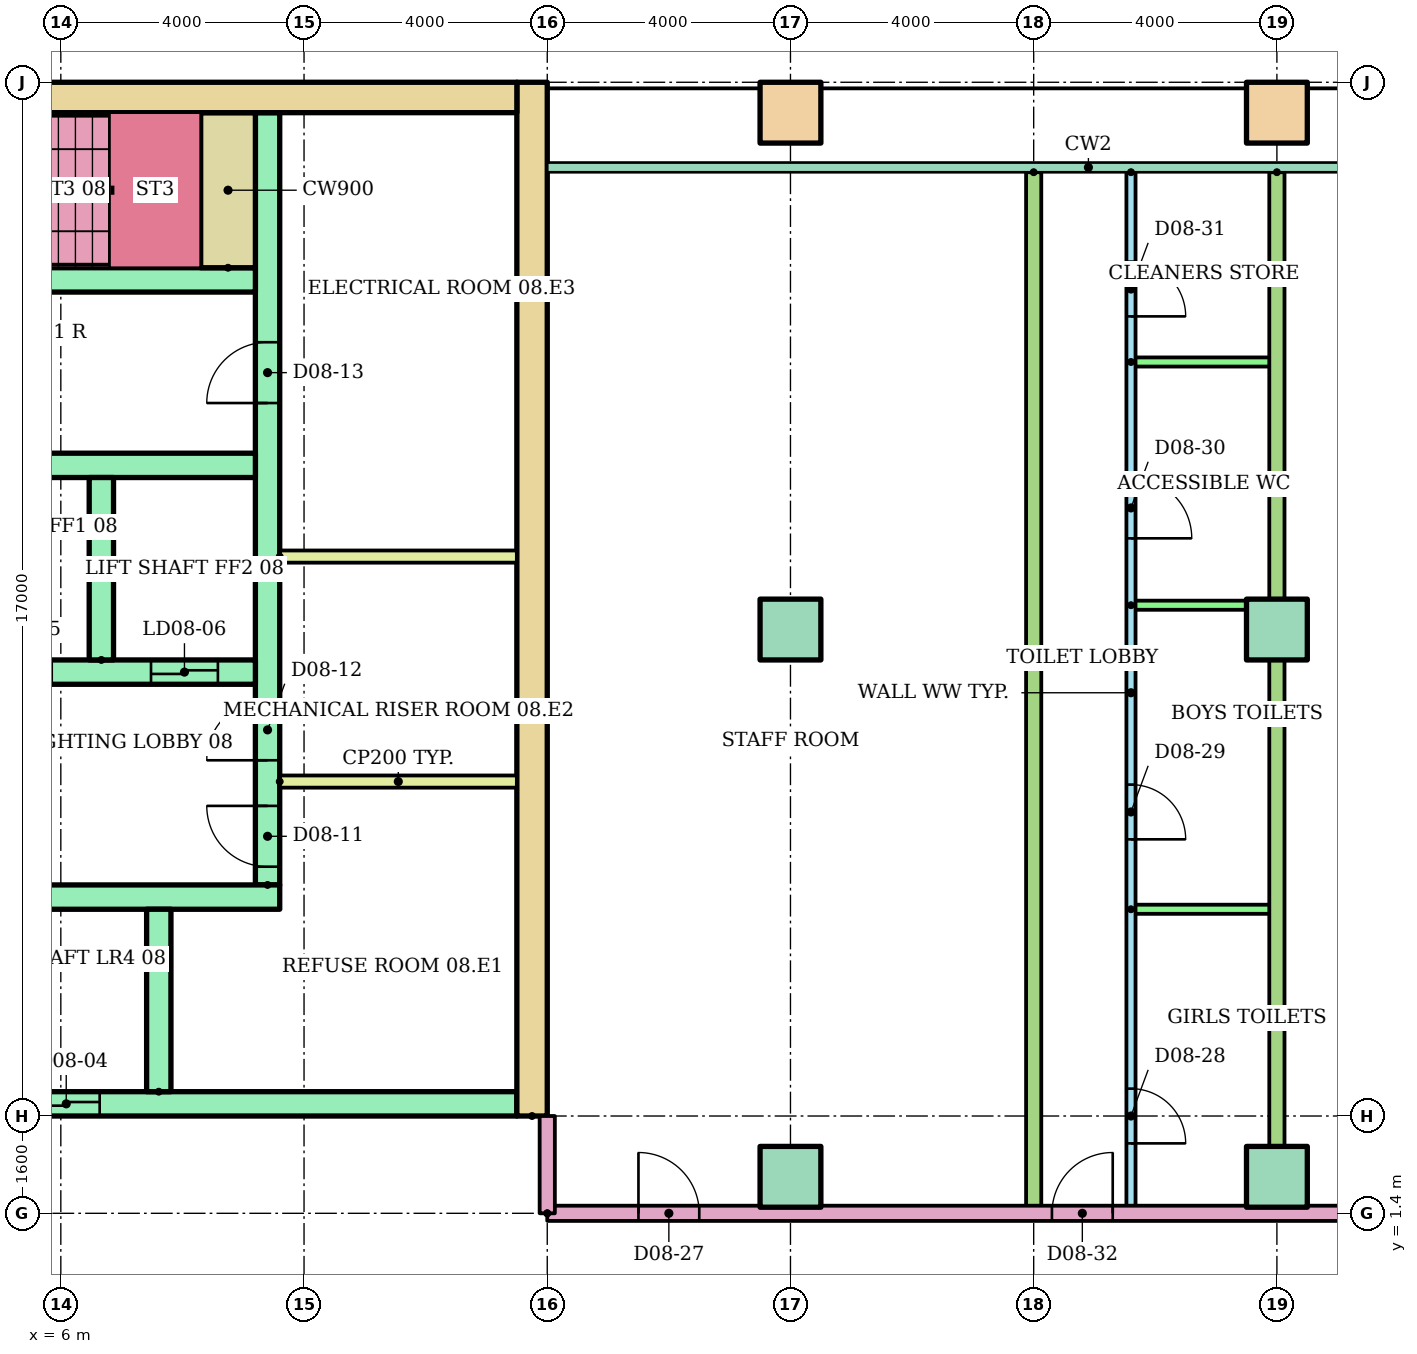
"""IFC4 building model, lengths in metres.
Left out: names, types, materials, properties, quantities, classifications, styles, units other than length and angle.
Written with IfcOpenShell. Run it as: python <this file> out.ifc"""

import sys

from ifc_helpers import new_model, si_unit, direction, frame, frame_2d, origin, origin_2d, place, context, subcontext, project, spatial, rectangle, hollow_rectangle, extrude, element, fill, save


model = new_model("IFC4")
c1 = context("Model", 3, precision=1e-05, world=origin(), true_north=direction((0.0, 1.0)))
c2 = subcontext(c1, "Body", "Model", "MODEL_VIEW")
j1 = project(units=[si_unit("LENGTHUNIT", "METRE"), si_unit("PLANEANGLEUNIT", "RADIAN")], contexts=[c1])
p1 = place(None, origin())
s1 = spatial("IfcSite", under=j1, at=p1, CompositionType="ELEMENT")
p2 = place(p1, origin())
s2 = spatial("IfcBuilding", under=s1, at=p2, CompositionType="ELEMENT")
p3 = place(p2, frame((0.0, 0.0, 33.8)))
s3 = spatial("IfcBuildingStorey", under=s2, at=p3, CompositionType="ELEMENT", Elevation=33.8)
for number, where in (
    (1, (18.0, 2.0, 0.0)),
    (2, (26.0, 2.0, 0.0)),
    (3, (18.0, 11.0, 0.0)),
    (4, (26.0, 11.0, 0.0)),
):
    element("IfcColumn", number, at=place(p3, frame(where)), inside=s3, PredefinedType="COLUMN", context=c2, shape_type="SweptSolid", body=[
        extrude(rectangle(XDim=1.0, YDim=1.0, at=origin_2d()), origin(), (0.0, 0.0, 1.0), 3.9),
    ])
for number, where in (
    (5, (18.0, 19.5, 0.0)),
    (6, (26.0, 19.5, 0.0)),
):
    element("IfcColumn", number, at=place(p3, frame(where)), inside=s3, PredefinedType="COLUMN", context=c2, shape_type="SweptSolid", body=[
        extrude(hollow_rectangle(XDim=1.0, YDim=1.0, WallThickness=0.05, at=origin_2d()), origin(), (0.0, 0.0, 1.0), 3.9),
    ])
p4 = place(p3, frame((13.75, 3.0, 0.0), z_axis=(0.0, 0.0, 1.0), x_axis=(0.0, 1.0, 0.0)))
e7 = element("IfcWall", 7, at=p4, inside=s3, PredefinedType="SHEAR", context=c2, shape_type="SweptSolid", body=[
    extrude(rectangle(XDim=17.0, YDim=0.5, at=frame_2d((8.5, 0.0))), origin(), (0.0, 0.0, 1.0), 3.6),
])
p5 = place(p3, frame((-13.5, 19.75, 0.0)))
e8 = element("IfcWall", 8, at=p5, inside=s3, PredefinedType="SHEAR", context=c2, shape_type="SweptSolid", body=[
    extrude(rectangle(XDim=27.0, YDim=0.5, at=frame_2d((13.5, 0.0))), origin(), (0.0, 0.0, 1.0), 3.6),
])
p6 = place(p3, frame((9.4, 6.8, 0.0), z_axis=(0.0, 0.0, 1.0), x_axis=(0.0, 1.0, 0.0)))
e9 = element("IfcWall", 9, at=p6, inside=s3, PredefinedType="SHEAR", context=c2, shape_type="SweptSolid", body=[
    extrude(rectangle(XDim=12.7, YDim=0.4, at=frame_2d((6.35, 0.0))), origin(), (0.0, 0.0, 1.0), 3.6),
])
p7 = place(p6, frame((0.3, 0.0, 0.0)))
e10 = element("IfcOpeningElement", 10, at=p7, cuts=e9, PredefinedType="OPENING", context=c2, shape_type="SweptSolid", body=[
    extrude(rectangle(XDim=1.0, YDim=2.1, at=frame_2d((0.5, 1.05))), frame((0.0, 0.21, 0.0), z_axis=(0.0, -1.0, 0.0), x_axis=(1.0, 0.0, 0.0)), (0.0, 0.0, 1.0), 0.42),
])
p8 = place(p6, frame((2.05, 0.0, 0.0)))
e11 = element("IfcOpeningElement", 11, at=p8, cuts=e9, PredefinedType="OPENING", context=c2, shape_type="SweptSolid", body=[
    extrude(rectangle(XDim=1.0, YDim=2.1, at=frame_2d((0.5, 1.05))), frame((0.0, 0.21, 0.0), z_axis=(0.0, -1.0, 0.0), x_axis=(1.0, 0.0, 0.0)), (0.0, 0.0, 1.0), 0.42),
])
p9 = place(p6, frame((7.925, 0.0, 0.0)))
e12 = element("IfcOpeningElement", 12, at=p9, cuts=e9, PredefinedType="OPENING", context=c2, shape_type="SweptSolid", body=[
    extrude(rectangle(XDim=1.0, YDim=2.1, at=frame_2d((0.5, 1.05))), frame((0.0, 0.21, 0.0), z_axis=(0.0, -1.0, 0.0), x_axis=(1.0, 0.0, 0.0)), (0.0, 0.0, 1.0), 0.42),
])
p10 = place(p3, frame((-13.5, 3.2, 0.0)))
e13 = element("IfcWall", 13, at=p10, inside=s3, PredefinedType="SHEAR", context=c2, shape_type="SweptSolid", body=[
    extrude(rectangle(XDim=27.0, YDim=0.4, at=frame_2d((13.5, 0.0))), origin(), (0.0, 0.0, 1.0), 3.6),
])
p11 = place(p10, frame((6.861, 0.0, 0.0)))
e14 = element("IfcOpeningElement", 14, at=p11, cuts=e13, PredefinedType="OPENING", context=c2, shape_type="SweptSolid", body=[
    extrude(rectangle(XDim=1.1, YDim=2.1, at=frame_2d((0.55, 1.05))), frame((0.0, 0.21, 0.0), z_axis=(0.0, -1.0, 0.0), x_axis=(1.0, 0.0, 0.0)), (0.0, 0.0, 1.0), 0.42),
])
p12 = place(p10, frame((9.906, 0.0, 0.0)))
e15 = element("IfcOpeningElement", 15, at=p12, cuts=e13, PredefinedType="OPENING", context=c2, shape_type="SweptSolid", body=[
    extrude(rectangle(XDim=1.1, YDim=2.1, at=frame_2d((0.55, 1.05))), frame((0.0, 0.21, 0.0), z_axis=(0.0, -1.0, 0.0), x_axis=(1.0, 0.0, 0.0)), (0.0, 0.0, 1.0), 0.42),
])
p13 = place(p10, frame((15.994, 0.0, 0.0)))
e16 = element("IfcOpeningElement", 16, at=p13, cuts=e13, PredefinedType="OPENING", context=c2, shape_type="SweptSolid", body=[
    extrude(rectangle(XDim=1.1, YDim=2.1, at=frame_2d((0.55, 1.05))), frame((0.0, 0.21, 0.0), z_axis=(0.0, -1.0, 0.0), x_axis=(1.0, 0.0, 0.0)), (0.0, 0.0, 1.0), 0.42),
])
p14 = place(p10, frame((19.039, 0.0, 0.0)))
e17 = element("IfcOpeningElement", 17, at=p14, cuts=e13, PredefinedType="OPENING", context=c2, shape_type="SweptSolid", body=[
    extrude(rectangle(XDim=1.1, YDim=2.1, at=frame_2d((0.55, 1.05))), frame((0.0, 0.21, 0.0), z_axis=(0.0, -1.0, 0.0), x_axis=(1.0, 0.0, 0.0)), (0.0, 0.0, 1.0), 0.42),
])
p15 = place(p10, frame((12.6, 0.0, 0.0)))
e18 = element("IfcOpeningElement", 18, at=p15, cuts=e13, PredefinedType="OPENING", context=c2, shape_type="SweptSolid", body=[
    extrude(rectangle(XDim=1.8, YDim=2.1, at=frame_2d((0.9, 1.05))), frame((0.0, 0.21, 0.0), z_axis=(0.0, -1.0, 0.0), x_axis=(1.0, 0.0, 0.0)), (0.0, 0.0, 1.0), 0.42),
])
p16 = place(p3, frame((1.522, 6.6, 0.0)))
e19 = element("IfcWall", 19, at=p16, inside=s3, PredefinedType="SHEAR", context=c2, shape_type="SweptSolid", body=[
    extrude(rectangle(XDim=8.078, YDim=0.4, at=frame_2d((4.039, 0.0))), origin(), (0.0, 0.0, 1.0), 3.6),
])
p17 = place(p3, frame((7.611, 3.4, 0.0), z_axis=(0.0, 0.0, 1.0), x_axis=(0.0, 1.0, 0.0)))
e20 = element("IfcWall", 20, at=p17, inside=s3, PredefinedType="SHEAR", context=c2, shape_type="SweptSolid", body=[
    extrude(rectangle(XDim=3.0, YDim=0.4, at=frame_2d((1.5, 0.0))), origin(), (0.0, 0.0, 1.0), 3.6),
])
p18 = place(p3, frame((1.2, 10.3, 0.0)))
e21 = element("IfcWall", 21, at=p18, inside=s3, PredefinedType="SHEAR", context=c2, shape_type="SweptSolid", body=[
    extrude(rectangle(XDim=8.0, YDim=0.4, at=frame_2d((4.0, 0.0))), origin(), (0.0, 0.0, 1.0), 3.6),
])
p19 = place(p18, frame((3.55, 0.0, 0.0)))
e22 = element("IfcOpeningElement", 22, at=p19, cuts=e21, PredefinedType="OPENING", context=c2, shape_type="SweptSolid", body=[
    extrude(rectangle(XDim=1.1, YDim=2.1, at=frame_2d((0.55, 1.05))), frame((0.0, 0.21, 0.0), z_axis=(0.0, -1.0, 0.0), x_axis=(1.0, 0.0, 0.0)), (0.0, 0.0, 1.0), 0.42),
])
p20 = place(p18, frame((6.283, 0.0, 0.0)))
e23 = element("IfcOpeningElement", 23, at=p20, cuts=e21, PredefinedType="OPENING", context=c2, shape_type="SweptSolid", body=[
    extrude(rectangle(XDim=1.1, YDim=2.1, at=frame_2d((0.55, 1.05))), frame((0.0, 0.21, 0.0), z_axis=(0.0, -1.0, 0.0), x_axis=(1.0, 0.0, 0.0)), (0.0, 0.0, 1.0), 0.42),
])
p21 = place(p18, frame((0.867, 0.0, 0.0)))
e24 = element("IfcOpeningElement", 24, at=p21, cuts=e21, PredefinedType="OPENING", context=c2, shape_type="SweptSolid", body=[
    extrude(rectangle(XDim=1.0, YDim=2.1, at=frame_2d((0.5, 1.05))), frame((0.0, 0.21, 0.0), z_axis=(0.0, -1.0, 0.0), x_axis=(1.0, 0.0, 0.0)), (0.0, 0.0, 1.0), 0.42),
])
p22 = place(p3, frame((1.2, 13.7, 0.0)))
e25 = element("IfcWall", 25, at=p22, inside=s3, PredefinedType="SHEAR", context=c2, shape_type="SweptSolid", body=[
    extrude(rectangle(XDim=8.0, YDim=0.4, at=frame_2d((4.0, 0.0))), origin(), (0.0, 0.0, 1.0), 3.6),
])
p23 = place(p3, frame((6.667, 10.5, 0.0), z_axis=(0.0, 0.0, 1.0), x_axis=(0.0, 1.0, 0.0)))
e26 = element("IfcWall", 26, at=p23, inside=s3, PredefinedType="SHEAR", context=c2, shape_type="SweptSolid", body=[
    extrude(rectangle(XDim=3.0, YDim=0.4, at=frame_2d((1.5, 0.0))), origin(), (0.0, 0.0, 1.0), 3.6),
])
p24 = place(p3, frame((-9.2, 16.75, 0.0)))
e27 = element("IfcWall", 27, at=p24, inside=s3, PredefinedType="SHEAR", context=c2, shape_type="SweptSolid", body=[
    extrude(rectangle(XDim=18.4, YDim=0.4, at=frame_2d((9.2, 0.0))), origin(), (0.0, 0.0, 1.0), 3.6),
])
p25 = place(p24, frame((0.1, 0.0, 0.0)))
e28 = element("IfcOpeningElement", 28, at=p25, cuts=e27, PredefinedType="OPENING", context=c2, shape_type="SweptSolid", body=[
    extrude(rectangle(XDim=0.95, YDim=2.1, at=frame_2d((0.475, 1.05))), frame((0.0, 0.21, 0.0), z_axis=(0.0, -1.0, 0.0), x_axis=(1.0, 0.0, 0.0)), (0.0, 0.0, 1.0), 0.42),
])
p26 = place(p24, frame((6.1, 0.0, 0.0)))
e29 = element("IfcOpeningElement", 29, at=p26, cuts=e27, PredefinedType="OPENING", context=c2, shape_type="SweptSolid", body=[
    extrude(rectangle(XDim=0.95, YDim=2.1, at=frame_2d((0.475, 1.05))), frame((0.0, 0.21, 0.0), z_axis=(0.0, -1.0, 0.0), x_axis=(1.0, 0.0, 0.0)), (0.0, 0.0, 1.0), 0.42),
])
p27 = place(p24, frame((12.1, 0.0, 0.0)))
e30 = element("IfcOpeningElement", 30, at=p27, cuts=e27, PredefinedType="OPENING", context=c2, shape_type="SweptSolid", body=[
    extrude(rectangle(XDim=0.95, YDim=2.1, at=frame_2d((0.475, 1.05))), frame((0.0, 0.21, 0.0), z_axis=(0.0, -1.0, 0.0), x_axis=(1.0, 0.0, 0.0)), (0.0, 0.0, 1.0), 0.42),
])
p28 = place(p3, frame((8.75, 16.95, 0.0), z_axis=(0.0, 0.0, 1.0), x_axis=(0.0, 1.0, 0.0)))
e31 = element("IfcWall", 31, at=p28, inside=s3, PredefinedType="SHEAR", context=c2, shape_type="SweptSolid", body=[
    extrude(rectangle(XDim=2.55, YDim=0.9, at=frame_2d((1.275, 0.0))), origin(), (0.0, 0.0, 1.0), 3.6),
])
for number, where in (
    (32, (9.6, 8.5, 0.0)),
    (33, (9.6, 12.2, 0.0)),
):
    element("IfcWall", number, at=place(p3, frame(where)), inside=s3, PredefinedType="PARTITIONING", context=c2, shape_type="SweptSolid", body=[
        extrude(rectangle(XDim=3.9, YDim=0.2, at=frame_2d((1.95, 0.0))), origin(), (0.0, 0.0, 1.0), 3.6),
    ])
p29 = place(p3, frame((14.0, 1.4, 0.0)))
e34 = element("IfcWall", 34, at=p29, inside=s3, PredefinedType="PARTITIONING", context=c2, shape_type="SweptSolid", body=[
    extrude(rectangle(XDim=15.0, YDim=0.25, at=frame_2d((7.5, 0.0))), origin(), (0.0, 0.0, 1.0), 3.1),
])
p30 = place(p29, frame((1.5, 0.0, 0.0)))
e35 = element("IfcOpeningElement", 35, at=p30, cuts=e34, PredefinedType="OPENING", context=c2, shape_type="SweptSolid", body=[
    extrude(rectangle(XDim=1.0, YDim=2.1, at=frame_2d((0.5, 1.05))), frame((0.0, 0.135, 0.0), z_axis=(0.0, -1.0, 0.0), x_axis=(1.0, 0.0, 0.0)), (0.0, 0.0, 1.0), 0.27),
])
p31 = place(p29, frame((8.3, 0.0, 0.0)))
e36 = element("IfcOpeningElement", 36, at=p31, cuts=e34, PredefinedType="OPENING", context=c2, shape_type="SweptSolid", body=[
    extrude(rectangle(XDim=1.0, YDim=2.1, at=frame_2d((0.5, 1.05))), frame((0.0, 0.135, 0.0), z_axis=(0.0, -1.0, 0.0), x_axis=(1.0, 0.0, 0.0)), (0.0, 0.0, 1.0), 0.27),
])
p32 = place(p29, frame((13.5, 0.0, 0.0)))
e37 = element("IfcOpeningElement", 37, at=p32, cuts=e34, PredefinedType="OPENING", context=c2, shape_type="SweptSolid", body=[
    extrude(rectangle(XDim=1.0, YDim=2.1, at=frame_2d((0.5, 1.05))), frame((0.0, 0.135, 0.0), z_axis=(0.0, -1.0, 0.0), x_axis=(1.0, 0.0, 0.0)), (0.0, 0.0, 1.0), 0.27),
])
p33 = place(p3, frame((23.6, 18.521, 0.0), z_axis=(0.0, 0.0, 1.0), x_axis=(0.0, -1.0, 0.0)))
e38 = element("IfcWall", 38, at=p33, inside=s3, PredefinedType="PARTITIONING", context=c2, shape_type="SweptSolid", body=[
    extrude(rectangle(XDim=17.121, YDim=0.15, at=frame_2d((8.561, 0.0))), origin(), (0.0, 0.0, 1.0), 3.1),
])
p34 = place(p33, frame((15.071, 0.0, 0.0)))
e39 = element("IfcOpeningElement", 39, at=p34, cuts=e38, PredefinedType="OPENING", context=c2, shape_type="SweptSolid", body=[
    extrude(rectangle(XDim=0.9, YDim=2.1, at=frame_2d((0.45, 1.05))), frame((0.0, 0.085, 0.0), z_axis=(0.0, -1.0, 0.0), x_axis=(1.0, 0.0, 0.0)), (0.0, 0.0, 1.0), 0.17),
])
p35 = place(p33, frame((10.071, 0.0, 0.0)))
e40 = element("IfcOpeningElement", 40, at=p35, cuts=e38, PredefinedType="OPENING", context=c2, shape_type="SweptSolid", body=[
    extrude(rectangle(XDim=0.9, YDim=2.1, at=frame_2d((0.45, 1.05))), frame((0.0, 0.085, 0.0), z_axis=(0.0, -1.0, 0.0), x_axis=(1.0, 0.0, 0.0)), (0.0, 0.0, 1.0), 0.17),
])
p36 = place(p33, frame((5.021, 0.0, 0.0)))
e41 = element("IfcOpeningElement", 41, at=p36, cuts=e38, PredefinedType="OPENING", context=c2, shape_type="SweptSolid", body=[
    extrude(rectangle(XDim=1.0, YDim=2.1, at=frame_2d((0.5, 1.05))), frame((0.0, 0.085, 0.0), z_axis=(0.0, -1.0, 0.0), x_axis=(1.0, 0.0, 0.0)), (0.0, 0.0, 1.0), 0.17),
])
p37 = place(p33, frame((1.471, 0.0, 0.0)))
e42 = element("IfcOpeningElement", 42, at=p37, cuts=e38, PredefinedType="OPENING", context=c2, shape_type="SweptSolid", body=[
    extrude(rectangle(XDim=0.9, YDim=2.1, at=frame_2d((0.45, 1.05))), frame((0.0, 0.085, 0.0), z_axis=(0.0, -1.0, 0.0), x_axis=(1.0, 0.0, 0.0)), (0.0, 0.0, 1.0), 0.17),
])
for number, where in (
    (43, (23.6, 6.4, 0.0)),
    (44, (23.6, 11.4, 0.0)),
    (45, (23.6, 15.4, 0.0)),
):
    element("IfcWall", number, at=place(p3, frame(where)), inside=s3, PredefinedType="PARTITIONING", context=c2, shape_type="SweptSolid", body=[
        extrude(rectangle(XDim=2.4, YDim=0.15, at=frame_2d((1.2, 0.0))), origin(), (0.0, 0.0, 1.0), 3.1),
    ])
for number, where, z_axis, x_axis in (
    (46, (22.0, 18.521, 0.0), (0.0, 0.0, 1.0), (0.0, -1.0, 0.0)),
    (47, (26.0, 18.521, 0.0), (0.0, 0.0, 1.0), (0.0, -1.0, 0.0)),
):
    element("IfcWall", number, at=place(p3, frame(where, z_axis=z_axis, x_axis=x_axis)), inside=s3, PredefinedType="PARTITIONING", context=c2, shape_type="SweptSolid", body=[
        extrude(rectangle(XDim=17.121, YDim=0.25, at=frame_2d((8.561, 0.0))), origin(), (0.0, 0.0, 1.0), 3.1),
    ])
p38 = place(p3, frame((14.0, 1.4, 0.0), z_axis=(0.0, 0.0, 1.0), x_axis=(0.0, 1.0, 0.0)))
e48 = element("IfcWall", 48, at=p38, inside=s3, PredefinedType="PARTITIONING", context=c2, shape_type="SweptSolid", body=[
    extrude(rectangle(XDim=1.6, YDim=0.25, at=frame_2d((0.8, 0.0))), origin(), (0.0, 0.0, 1.0), 3.1),
])
p39 = place(p14, origin())
e49 = element("IfcDoor", 49, at=p39, inside=s3, OperationType="SLIDING_TO_LEFT", PredefinedType="DOOR", context=c2, shape_type="SweptSolid", body=[
    extrude(rectangle(XDim=1.1, YDim=2.1, at=frame_2d((0.55, 1.05))), frame((0.0, 0.025, 0.0), z_axis=(0.0, -1.0, 0.0), x_axis=(1.0, 0.0, 0.0)), (0.0, 0.0, 1.0), 0.05),
])
fill(e17, e49)
p40 = place(p20, origin())
e50 = element("IfcDoor", 50, at=p40, inside=s3, OperationType="SLIDING_TO_LEFT", PredefinedType="DOOR", context=c2, shape_type="SweptSolid", body=[
    extrude(rectangle(XDim=1.1, YDim=2.1, at=frame_2d((0.55, 1.05))), frame((0.0, 0.025, 0.0), z_axis=(0.0, -1.0, 0.0), x_axis=(1.0, 0.0, 0.0)), (0.0, 0.0, 1.0), 0.05),
])
fill(e23, e50)
p41 = place(p7, origin())
e51 = element("IfcDoor", 51, at=p41, inside=s3, OperationType="SINGLE_SWING_RIGHT", PredefinedType="DOOR", context=c2, shape_type="SweptSolid", body=[
    extrude(rectangle(XDim=1.0, YDim=2.1, at=frame_2d((0.5, 1.05))), frame((0.0, 0.025, 0.0), z_axis=(0.0, -1.0, 0.0), x_axis=(1.0, 0.0, 0.0)), (0.0, 0.0, 1.0), 0.05),
])
fill(e10, e51)
p42 = place(p8, origin())
e52 = element("IfcDoor", 52, at=p42, inside=s3, OperationType="SINGLE_SWING_LEFT", PredefinedType="DOOR", context=c2, shape_type="SweptSolid", body=[
    extrude(rectangle(XDim=1.0, YDim=2.1, at=frame_2d((0.5, 1.05))), frame((0.0, 0.025, 0.0), z_axis=(0.0, -1.0, 0.0), x_axis=(1.0, 0.0, 0.0)), (0.0, 0.0, 1.0), 0.05),
])
fill(e11, e52)
p43 = place(p9, origin())
e53 = element("IfcDoor", 53, at=p43, inside=s3, OperationType="SINGLE_SWING_LEFT", PredefinedType="DOOR", context=c2, shape_type="SweptSolid", body=[
    extrude(rectangle(XDim=1.0, YDim=2.1, at=frame_2d((0.5, 1.05))), frame((0.0, 0.025, 0.0), z_axis=(0.0, -1.0, 0.0), x_axis=(1.0, 0.0, 0.0)), (0.0, 0.0, 1.0), 0.05),
])
fill(e12, e53)
p44 = place(p30, origin())
e54 = element("IfcDoor", 54, at=p44, inside=s3, OperationType="SINGLE_SWING_LEFT", PredefinedType="DOOR", context=c2, shape_type="SweptSolid", body=[
    extrude(rectangle(XDim=1.0, YDim=2.1, at=frame_2d((0.5, 1.05))), frame((0.0, 0.025, 0.0), z_axis=(0.0, -1.0, 0.0), x_axis=(1.0, 0.0, 0.0)), (0.0, 0.0, 1.0), 0.05),
])
fill(e35, e54)
p45 = place(p34, origin())
e55 = element("IfcDoor", 55, at=p45, inside=s3, OperationType="SINGLE_SWING_RIGHT", PredefinedType="DOOR", context=c2, shape_type="SweptSolid", body=[
    extrude(rectangle(XDim=0.9, YDim=2.1, at=frame_2d((0.45, 1.05))), frame((0.0, 0.025, 0.0), z_axis=(0.0, -1.0, 0.0), x_axis=(1.0, 0.0, 0.0)), (0.0, 0.0, 1.0), 0.05),
])
fill(e39, e55)
p46 = place(p35, origin())
e56 = element("IfcDoor", 56, at=p46, inside=s3, OperationType="SINGLE_SWING_RIGHT", PredefinedType="DOOR", context=c2, shape_type="SweptSolid", body=[
    extrude(rectangle(XDim=0.9, YDim=2.1, at=frame_2d((0.45, 1.05))), frame((0.0, 0.025, 0.0), z_axis=(0.0, -1.0, 0.0), x_axis=(1.0, 0.0, 0.0)), (0.0, 0.0, 1.0), 0.05),
])
fill(e40, e56)
p47 = place(p36, origin())
e57 = element("IfcDoor", 57, at=p47, inside=s3, OperationType="SINGLE_SWING_RIGHT", PredefinedType="DOOR", context=c2, shape_type="SweptSolid", body=[
    extrude(rectangle(XDim=1.0, YDim=2.1, at=frame_2d((0.5, 1.05))), frame((0.0, 0.025, 0.0), z_axis=(0.0, -1.0, 0.0), x_axis=(1.0, 0.0, 0.0)), (0.0, 0.0, 1.0), 0.05),
])
fill(e41, e57)
p48 = place(p37, origin())
e58 = element("IfcDoor", 58, at=p48, inside=s3, OperationType="SINGLE_SWING_RIGHT", PredefinedType="DOOR", context=c2, shape_type="SweptSolid", body=[
    extrude(rectangle(XDim=0.9, YDim=2.1, at=frame_2d((0.45, 1.05))), frame((0.0, 0.025, 0.0), z_axis=(0.0, -1.0, 0.0), x_axis=(1.0, 0.0, 0.0)), (0.0, 0.0, 1.0), 0.05),
])
fill(e42, e58)
p49 = place(p31, origin())
e59 = element("IfcDoor", 59, at=p49, inside=s3, OperationType="SINGLE_SWING_RIGHT", PredefinedType="DOOR", context=c2, shape_type="SweptSolid", body=[
    extrude(rectangle(XDim=1.0, YDim=2.1, at=frame_2d((0.5, 1.05))), frame((0.0, 0.025, 0.0), z_axis=(0.0, -1.0, 0.0), x_axis=(1.0, 0.0, 0.0)), (0.0, 0.0, 1.0), 0.05),
])
fill(e36, e59)
save(model, sys.argv[1])
